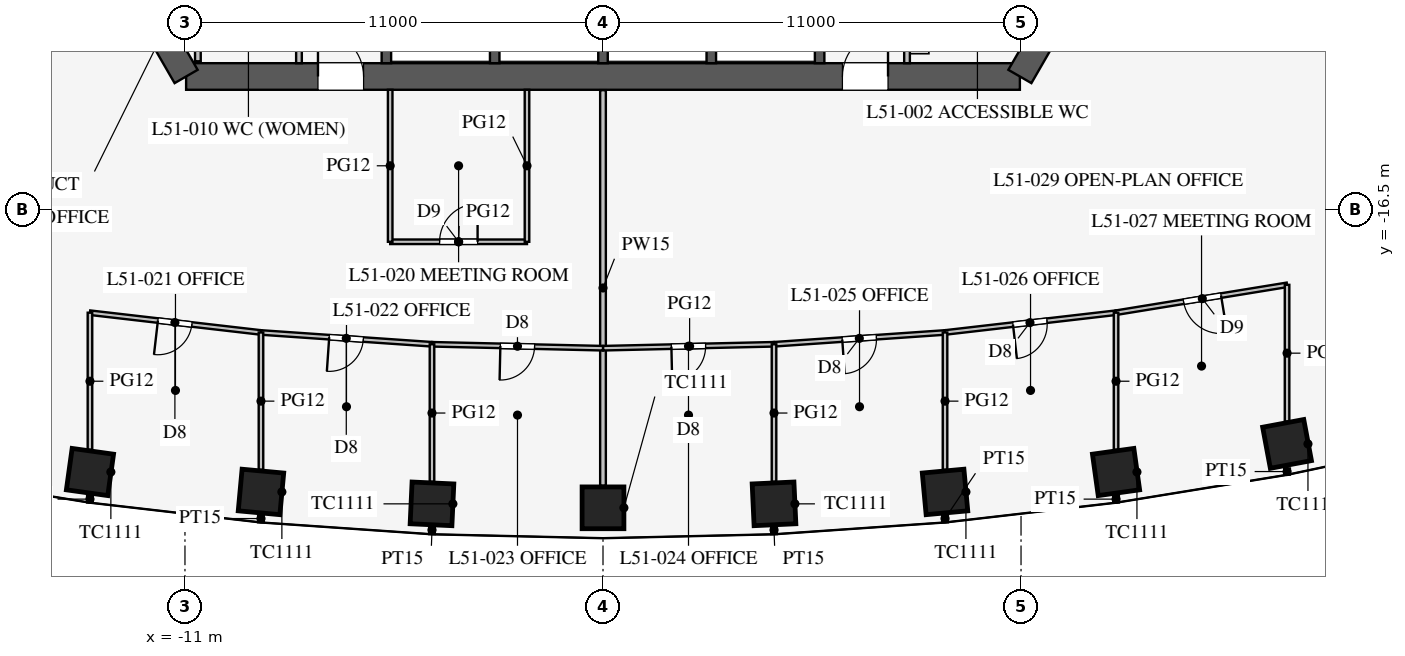
"""IFC4 building model, lengths in metres.
Left out: names, types, materials, properties, quantities, classifications, styles, units other than length and angle.
Written with IfcOpenShell. Run it as: python <this file> out.ifc"""

import sys

from ifc_helpers import new_model, si_unit, direction, frame, frame_2d, origin, origin_2d, place, context, subcontext, project, spatial, rectangle, extrude, element, fill, save


model = new_model("IFC4")
c1 = context("Model", 3, precision=1e-05, world=origin(), true_north=direction((0.0, 1.0)))
c2 = subcontext(c1, "Body", "Model", "MODEL_VIEW")
j1 = project(units=[si_unit("LENGTHUNIT", "METRE"), si_unit("PLANEANGLEUNIT", "RADIAN")], contexts=[c1])
p1 = place(None, origin())
s1 = spatial("IfcSite", under=j1, at=p1, CompositionType="ELEMENT")
p2 = place(p1, origin())
s2 = spatial("IfcBuilding", under=s1, at=p2, CompositionType="ELEMENT")
p3 = place(p2, frame((0.0, 0.0, 223.3)))
s3 = spatial("IfcBuildingStorey", under=s2, at=p3, CompositionType="ELEMENT", Elevation=223.3)
for number, where, z_axis, x_axis in (
    (1, (-13.5, -23.408, 0.0), (0.0, 0.0, 1.0), (0.99, -0.138, 0.0)),
    (2, (-9.0, -23.933, 0.0), (0.0, 0.0, 1.0), (0.996, -0.092, 0.0)),
    (3, (-4.5, -24.246, 0.0), (0.0, 0.0, 1.0), (0.999, -0.046, 0.0)),
    (4, (0.0, -24.351, 0.0), (0.0, 0.0, 1.0), (1.0, 0.0, 0.0)),
    (5, (4.5, -24.246, 0.0), (0.0, 0.0, 1.0), (0.999, 0.046, 0.0)),
    (6, (9.0, -23.933, 0.0), (0.0, 0.0, 1.0), (0.996, 0.092, 0.0)),
    (7, (13.5, -23.408, 0.0), (0.0, 0.0, 1.0), (0.99, 0.138, 0.0)),
    (8, (18.0, -22.669, 0.0), (0.0, 0.0, 1.0), (0.983, 0.184, 0.0)),
):
    element("IfcColumn", number, at=place(p3, frame(where, z_axis=z_axis, x_axis=x_axis)), inside=s3, PredefinedType="COLUMN", context=c2, shape_type="SweptSolid", body=[
        extrude(rectangle(XDim=1.1, YDim=1.1, at=origin_2d()), origin(), (0.0, 0.0, 1.0), 4.2),
    ])
p4 = place(p3, frame((-10.97, -13.0, 0.0), z_axis=(0.0, 0.0, 1.0), x_axis=(1.0, 0.0, 0.0)))
e9 = element("IfcWall", 9, at=p4, inside=s3, PredefinedType="SHEAR", context=c2, shape_type="SweptSolid", body=[
    extrude(rectangle(XDim=21.939, YDim=0.7, at=frame_2d((10.97, 0.0))), origin(), (0.0, 0.0, 1.0), 4.2),
])
p5 = place(p4, frame((17.27, 0.0, 0.0)))
e10 = element("IfcOpeningElement", 10, at=p5, cuts=e9, PredefinedType="OPENING", context=c2, shape_type="SweptSolid", body=[
    extrude(rectangle(XDim=1.2, YDim=2.1, at=frame_2d((0.6, 1.05))), frame((0.0, 0.36, 0.0), z_axis=(0.0, -1.0, 0.0), x_axis=(1.0, 0.0, 0.0)), (0.0, 0.0, 1.0), 0.72),
])
p6 = place(p4, frame((3.47, 0.0, 0.0)))
e11 = element("IfcOpeningElement", 11, at=p6, cuts=e9, PredefinedType="OPENING", context=c2, shape_type="SweptSolid", body=[
    extrude(rectangle(XDim=1.2, YDim=2.1, at=frame_2d((0.6, 1.05))), frame((0.0, 0.36, 0.0), z_axis=(0.0, -1.0, 0.0), x_axis=(1.0, 0.0, 0.0)), (0.0, 0.0, 1.0), 0.72),
])
for number, where, z_axis, x_axis in (
    (12, (10.97, -13.0, 0.0), (0.0, 0.0, 1.0), (0.5, 0.866, 0.0)),
    (13, (-16.743, -3.0, 0.0), (0.0, 0.0, 1.0), (0.5, -0.866, 0.0)),
):
    element("IfcWall", number, at=place(p3, frame(where, z_axis=z_axis, x_axis=x_axis)), inside=s3, PredefinedType="SHEAR", context=c2, shape_type="SweptSolid", body=[
        extrude(rectangle(XDim=11.547, YDim=0.7, at=frame_2d((5.773, 0.0))), origin(), (0.0, 0.0, 1.0), 4.2),
    ])
for number, where, z_axis, x_axis in (
    (14, (-5.7, -10.025, 0.0), (0.0, 0.0, 1.0), (0.0, -1.0, 0.0)),
    (15, (-2.85, -10.025, 0.0), (0.0, 0.0, 1.0), (0.0, -1.0, 0.0)),
    (16, (0.0, -10.025, 0.0), (0.0, 0.0, 1.0), (0.0, -1.0, 0.0)),
    (17, (2.85, -10.025, 0.0), (0.0, 0.0, 1.0), (0.0, -1.0, 0.0)),
    (18, (5.7, -10.025, 0.0), (0.0, 0.0, 1.0), (0.0, -1.0, 0.0)),
):
    element("IfcWall", number, at=place(p3, frame(where, z_axis=z_axis, x_axis=x_axis)), inside=s3, PredefinedType="SHEAR", context=c2, shape_type="SweptSolid", body=[
        extrude(rectangle(XDim=2.625, YDim=0.25, at=frame_2d((1.312, 0.0))), origin(), (0.0, 0.0, 1.0), 4.2),
    ])
p7 = place(p3, frame((8.0, -7.5, 0.0), z_axis=(0.0, 0.0, 1.0), x_axis=(0.0, -1.0, 0.0)))
e19 = element("IfcWall", 19, at=p7, inside=s3, PredefinedType="PARTITIONING", context=c2, shape_type="SweptSolid", body=[
    extrude(rectangle(XDim=5.15, YDim=0.15, at=frame_2d((2.575, 0.0))), origin(), (0.0, 0.0, 1.0), 4.0),
])
p8 = place(p7, frame((2.6, 0.0, 0.0)))
e20 = element("IfcOpeningElement", 20, at=p8, cuts=e19, PredefinedType="OPENING", context=c2, shape_type="SweptSolid", body=[
    extrude(rectangle(XDim=0.9, YDim=2.1, at=frame_2d((0.45, 1.05))), frame((0.0, 0.085, 0.0), z_axis=(0.0, -1.0, 0.0), x_axis=(1.0, 0.0, 0.0)), (0.0, 0.0, 1.0), 0.17),
])
p9 = place(p3, frame((-8.0, -7.5, 0.0), z_axis=(0.0, 0.0, 1.0), x_axis=(0.0, -1.0, 0.0)))
e21 = element("IfcWall", 21, at=p9, inside=s3, PredefinedType="PARTITIONING", context=c2, shape_type="SweptSolid", body=[
    extrude(rectangle(XDim=5.15, YDim=0.15, at=frame_2d((2.575, 0.0))), origin(), (0.0, 0.0, 1.0), 4.0),
])
p10 = place(p9, frame((2.6, 0.0, 0.0)))
e22 = element("IfcOpeningElement", 22, at=p10, cuts=e21, PredefinedType="OPENING", context=c2, shape_type="SweptSolid", body=[
    extrude(rectangle(XDim=0.9, YDim=2.1, at=frame_2d((0.45, 1.05))), frame((0.0, 0.085, 0.0), z_axis=(0.0, -1.0, 0.0), x_axis=(1.0, 0.0, 0.0)), (0.0, 0.0, 1.0), 0.17),
])
p11 = place(p3, frame((-10.66, -8.5, 0.0), z_axis=(0.0, 0.0, 1.0), x_axis=(0.0, -1.0, 0.0)))
e23 = element("IfcWall", 23, at=p11, inside=s3, PredefinedType="PARTITIONING", context=c2, shape_type="SweptSolid", body=[
    extrude(rectangle(XDim=4.1, YDim=0.15, at=frame_2d((2.05, 0.0))), origin(), (0.0, 0.0, 1.0), 4.0),
])
for number, where, z_axis, x_axis in (
    (24, (14.159, -8.175, 0.0), (0.0, 0.0, 1.0), (0.866, -0.5, 0.0)),
    (25, (-14.159, -8.175, 0.0), (0.0, 0.0, 1.0), (-0.866, -0.5, 0.0)),
):
    element("IfcWall", number, at=place(p3, frame(where, z_axis=z_axis, x_axis=x_axis)), inside=s3, PredefinedType="PARTITIONING", context=c2, shape_type="SweptSolid", body=[
        extrude(rectangle(XDim=15.0, YDim=0.15, at=frame_2d((7.5, 0.0))), origin(), (0.0, 0.0, 1.0), 2.4),
    ])
p12 = place(p3, frame((0.0, -13.36, 0.0), z_axis=(0.0, 0.0, 1.0), x_axis=(0.0, -1.0, 0.0)))
e26 = element("IfcWall", 26, at=p12, inside=s3, PredefinedType="PARTITIONING", context=c2, shape_type="SweptSolid", body=[
    extrude(rectangle(XDim=10.411, YDim=0.15, at=frame_2d((5.205, 0.0))), origin(), (0.0, 0.0, 1.0), 3.3),
])
p13 = place(p3, frame((-5.6, -17.35, 0.0), z_axis=(0.0, 0.0, 1.0), x_axis=(1.0, 0.0, 0.0)))
e27 = element("IfcWall", 27, at=p13, inside=s3, PredefinedType="PARTITIONING", context=c2, shape_type="SweptSolid", body=[
    extrude(rectangle(XDim=3.6, YDim=0.12, at=frame_2d((1.8, 0.0))), origin(), (0.0, 0.0, 1.0), 2.9),
])
p14 = place(p13, frame((1.3, 0.0, 0.15)))
e28 = element("IfcOpeningElement", 28, at=p14, cuts=e27, PredefinedType="OPENING", context=c2, shape_type="SweptSolid", body=[
    extrude(rectangle(XDim=1.0, YDim=2.1, at=frame_2d((0.5, 1.05))), frame((0.0, 0.07, 0.0), z_axis=(0.0, -1.0, 0.0), x_axis=(1.0, 0.0, 0.0)), (0.0, 0.0, 1.0), 0.14),
])
for number, where, z_axis, x_axis in (
    (29, (-2.0, -13.35, 0.0), (0.0, 0.0, 1.0), (0.0, -1.0, 0.0)),
    (30, (-5.6, -13.35, 0.0), (0.0, 0.0, 1.0), (0.0, -1.0, 0.0)),
):
    element("IfcWall", number, at=place(p3, frame(where, z_axis=z_axis, x_axis=x_axis)), inside=s3, PredefinedType="PARTITIONING", context=c2, shape_type="SweptSolid", body=[
        extrude(rectangle(XDim=4.0, YDim=0.12, at=frame_2d((2.0, 0.0))), origin(), (0.0, 0.0, 1.0), 2.9),
    ])
p15 = place(p3, frame((13.5, -24.033, 0.0), z_axis=(0.0, 0.0, 1.0), x_axis=(0.0, -1.0, 0.0)))
e31 = element("IfcWall", 31, at=p15, inside=s3, PredefinedType="PARTITIONING", context=c2, shape_type="SweptSolid", body=[
    extrude(rectangle(XDim=0.178, YDim=0.15, at=frame_2d((0.089, 0.0))), origin(), (0.0, 0.0, 1.0), 2.9),
])
p16 = place(p3, frame((18.0, -23.315, 0.0), z_axis=(0.0, 0.0, 1.0), x_axis=(0.0, -1.0, 0.0)))
e32 = element("IfcWall", 32, at=p16, inside=s3, PredefinedType="PARTITIONING", context=c2, shape_type="SweptSolid", body=[
    extrude(rectangle(XDim=0.163, YDim=0.15, at=frame_2d((0.082, 0.0))), origin(), (0.0, 0.0, 1.0), 2.9),
])
p17 = place(p3, frame((4.5, -24.825, 0.0), z_axis=(0.0, 0.0, 1.0), x_axis=(0.0, -1.0, 0.0)))
e33 = element("IfcWall", 33, at=p17, inside=s3, PredefinedType="PARTITIONING", context=c2, shape_type="SweptSolid", body=[
    extrude(rectangle(XDim=0.217, YDim=0.15, at=frame_2d((0.108, 0.0))), origin(), (0.0, 0.0, 1.0), 2.9),
])
p18 = place(p3, frame((9.0, -24.535, 0.0), z_axis=(0.0, 0.0, 1.0), x_axis=(0.0, -1.0, 0.0)))
e34 = element("IfcWall", 34, at=p18, inside=s3, PredefinedType="PARTITIONING", context=c2, shape_type="SweptSolid", body=[
    extrude(rectangle(XDim=0.196, YDim=0.15, at=frame_2d((0.098, 0.0))), origin(), (0.0, 0.0, 1.0), 2.9),
])
p19 = place(p3, frame((-13.5, -24.033, 0.0), z_axis=(0.0, 0.0, 1.0), x_axis=(0.0, -1.0, 0.0)))
e35 = element("IfcWall", 35, at=p19, inside=s3, PredefinedType="PARTITIONING", context=c2, shape_type="SweptSolid", body=[
    extrude(rectangle(XDim=0.178, YDim=0.15, at=frame_2d((0.089, 0.0))), origin(), (0.0, 0.0, 1.0), 2.9),
])
p20 = place(p3, frame((-4.5, -24.825, 0.0), z_axis=(0.0, 0.0, 1.0), x_axis=(0.0, -1.0, 0.0)))
e36 = element("IfcWall", 36, at=p20, inside=s3, PredefinedType="PARTITIONING", context=c2, shape_type="SweptSolid", body=[
    extrude(rectangle(XDim=0.217, YDim=0.15, at=frame_2d((0.108, 0.0))), origin(), (0.0, 0.0, 1.0), 2.9),
])
p21 = place(p3, frame((-9.0, -24.535, 0.0), z_axis=(0.0, 0.0, 1.0), x_axis=(0.0, -1.0, 0.0)))
e37 = element("IfcWall", 37, at=p21, inside=s3, PredefinedType="PARTITIONING", context=c2, shape_type="SweptSolid", body=[
    extrude(rectangle(XDim=0.196, YDim=0.15, at=frame_2d((0.098, 0.0))), origin(), (0.0, 0.0, 1.0), 2.9),
])
p22 = place(p3, frame((0.0, -20.151, 0.0), z_axis=(0.0, 0.0, 1.0), x_axis=(0.99973552509, 0.022997388381, 0.0)))
e38 = element("IfcWall", 38, at=p22, inside=s3, PredefinedType="PARTITIONING", context=c2, shape_type="SweptSolid", body=[
    extrude(rectangle(XDim=4.501, YDim=0.12, at=frame_2d((2.25, 0.0))), origin(), (0.0, 0.0, 1.0), 2.9),
])
p23 = place(p22, frame((1.8, 0.0, 0.15)))
e39 = element("IfcOpeningElement", 39, at=p23, cuts=e38, PredefinedType="OPENING", context=c2, shape_type="SweptSolid", body=[
    extrude(rectangle(XDim=0.9, YDim=2.1, at=frame_2d((0.45, 1.05))), frame((0.0, 0.07, 0.0), z_axis=(0.0, -1.0, 0.0), x_axis=(1.0, 0.0, 0.0)), (0.0, 0.0, 1.0), 0.14),
])
p24 = place(p3, frame((13.5, -19.216, 0.0), z_axis=(0.0, 0.0, 1.0), x_axis=(0.986986525477, 0.160802980469, 0.0)))
e40 = element("IfcWall", 40, at=p24, inside=s3, PredefinedType="PARTITIONING", context=c2, shape_type="SweptSolid", body=[
    extrude(rectangle(XDim=4.559, YDim=0.12, at=frame_2d((2.28, 0.0))), origin(), (0.0, 0.0, 1.0), 2.9),
])
p25 = place(p24, frame((1.8, 0.0, 0.15)))
e41 = element("IfcOpeningElement", 41, at=p25, cuts=e40, PredefinedType="OPENING", context=c2, shape_type="SweptSolid", body=[
    extrude(rectangle(XDim=1.0, YDim=2.1, at=frame_2d((0.5, 1.05))), frame((0.0, 0.07, 0.0), z_axis=(0.0, -1.0, 0.0), x_axis=(1.0, 0.0, 0.0)), (0.0, 0.0, 1.0), 0.14),
])
p26 = place(p3, frame((4.5, -20.047, 0.0), z_axis=(0.0, 0.0, 1.0), x_axis=(0.997623533978, 0.068900540297, 0.0)))
e42 = element("IfcWall", 42, at=p26, inside=s3, PredefinedType="PARTITIONING", context=c2, shape_type="SweptSolid", body=[
    extrude(rectangle(XDim=4.511, YDim=0.12, at=frame_2d((2.255, 0.0))), origin(), (0.0, 0.0, 1.0), 2.9),
])
p27 = place(p26, frame((1.8, 0.0, 0.15)))
e43 = element("IfcOpeningElement", 43, at=p27, cuts=e42, PredefinedType="OPENING", context=c2, shape_type="SweptSolid", body=[
    extrude(rectangle(XDim=0.9, YDim=2.1, at=frame_2d((0.45, 1.05))), frame((0.0, 0.07, 0.0), z_axis=(0.0, -1.0, 0.0), x_axis=(1.0, 0.0, 0.0)), (0.0, 0.0, 1.0), 0.14),
])
p28 = place(p3, frame((9.0, -19.736, 0.0), z_axis=(0.0, 0.0, 1.0), x_axis=(0.993382946625, 0.114849124309, 0.0)))
e44 = element("IfcWall", 44, at=p28, inside=s3, PredefinedType="PARTITIONING", context=c2, shape_type="SweptSolid", body=[
    extrude(rectangle(XDim=4.53, YDim=0.12, at=frame_2d((2.265, 0.0))), origin(), (0.0, 0.0, 1.0), 2.9),
])
p29 = place(p28, frame((1.8, 0.0, 0.15)))
e45 = element("IfcOpeningElement", 45, at=p29, cuts=e44, PredefinedType="OPENING", context=c2, shape_type="SweptSolid", body=[
    extrude(rectangle(XDim=0.9, YDim=2.1, at=frame_2d((0.45, 1.05))), frame((0.0, 0.07, 0.0), z_axis=(0.0, -1.0, 0.0), x_axis=(1.0, 0.0, 0.0)), (0.0, 0.0, 1.0), 0.14),
])
p30 = place(p3, frame((-13.5, -19.216, 0.0), z_axis=(0.0, 0.0, 1.0), x_axis=(0.993382946625, -0.114849124309, 0.0)))
e46 = element("IfcWall", 46, at=p30, inside=s3, PredefinedType="PARTITIONING", context=c2, shape_type="SweptSolid", body=[
    extrude(rectangle(XDim=4.53, YDim=0.12, at=frame_2d((2.265, 0.0))), origin(), (0.0, 0.0, 1.0), 2.9),
])
p31 = place(p30, frame((1.8, 0.0, 0.15)))
e47 = element("IfcOpeningElement", 47, at=p31, cuts=e46, PredefinedType="OPENING", context=c2, shape_type="SweptSolid", body=[
    extrude(rectangle(XDim=0.9, YDim=2.1, at=frame_2d((0.45, 1.05))), frame((0.0, 0.07, 0.0), z_axis=(0.0, -1.0, 0.0), x_axis=(1.0, 0.0, 0.0)), (0.0, 0.0, 1.0), 0.14),
])
p32 = place(p3, frame((-4.5, -20.047, 0.0), z_axis=(0.0, 0.0, 1.0), x_axis=(0.99973552509, -0.022997388381, 0.0)))
e48 = element("IfcWall", 48, at=p32, inside=s3, PredefinedType="PARTITIONING", context=c2, shape_type="SweptSolid", body=[
    extrude(rectangle(XDim=4.501, YDim=0.12, at=frame_2d((2.25, 0.0))), origin(), (0.0, 0.0, 1.0), 2.9),
])
p33 = place(p32, frame((1.8, 0.0, 0.15)))
e49 = element("IfcOpeningElement", 49, at=p33, cuts=e48, PredefinedType="OPENING", context=c2, shape_type="SweptSolid", body=[
    extrude(rectangle(XDim=0.9, YDim=2.1, at=frame_2d((0.45, 1.05))), frame((0.0, 0.07, 0.0), z_axis=(0.0, -1.0, 0.0), x_axis=(1.0, 0.0, 0.0)), (0.0, 0.0, 1.0), 0.14),
])
p34 = place(p3, frame((-9.0, -19.736, 0.0), z_axis=(0.0, 0.0, 1.0), x_axis=(0.997623533978, -0.068900540297, 0.0)))
e50 = element("IfcWall", 50, at=p34, inside=s3, PredefinedType="PARTITIONING", context=c2, shape_type="SweptSolid", body=[
    extrude(rectangle(XDim=4.511, YDim=0.12, at=frame_2d((2.255, 0.0))), origin(), (0.0, 0.0, 1.0), 2.9),
])
p35 = place(p34, frame((1.8, 0.0, 0.15)))
e51 = element("IfcOpeningElement", 51, at=p35, cuts=e50, PredefinedType="OPENING", context=c2, shape_type="SweptSolid", body=[
    extrude(rectangle(XDim=0.9, YDim=2.1, at=frame_2d((0.45, 1.05))), frame((0.0, 0.07, 0.0), z_axis=(0.0, -1.0, 0.0), x_axis=(1.0, 0.0, 0.0)), (0.0, 0.0, 1.0), 0.14),
])
p36 = place(p3, frame((13.5, -19.216, 0.0), z_axis=(0.0, 0.0, 1.0), x_axis=(0.0, -1.0, 0.0)))
e52 = element("IfcWall", 52, at=p36, inside=s3, PredefinedType="PARTITIONING", context=c2, shape_type="SweptSolid", body=[
    extrude(rectangle(XDim=3.607, YDim=0.12, at=frame_2d((1.803, 0.0))), origin(), (0.0, 0.0, 1.0), 2.9),
])
p37 = place(p3, frame((18.0, -18.483, 0.0), z_axis=(0.0, 0.0, 1.0), x_axis=(0.0, -1.0, 0.0)))
e53 = element("IfcWall", 53, at=p37, inside=s3, PredefinedType="PARTITIONING", context=c2, shape_type="SweptSolid", body=[
    extrude(rectangle(XDim=3.596, YDim=0.12, at=frame_2d((1.798, 0.0))), origin(), (0.0, 0.0, 1.0), 2.9),
])
p38 = place(p3, frame((4.5, -20.047, 0.0), z_axis=(0.0, 0.0, 1.0), x_axis=(0.0, -1.0, 0.0)))
e54 = element("IfcWall", 54, at=p38, inside=s3, PredefinedType="PARTITIONING", context=c2, shape_type="SweptSolid", body=[
    extrude(rectangle(XDim=3.619, YDim=0.12, at=frame_2d((1.809, 0.0))), origin(), (0.0, 0.0, 1.0), 2.9),
])
p39 = place(p3, frame((9.0, -19.736, 0.0), z_axis=(0.0, 0.0, 1.0), x_axis=(0.0, -1.0, 0.0)))
e55 = element("IfcWall", 55, at=p39, inside=s3, PredefinedType="PARTITIONING", context=c2, shape_type="SweptSolid", body=[
    extrude(rectangle(XDim=3.614, YDim=0.12, at=frame_2d((1.807, 0.0))), origin(), (0.0, 0.0, 1.0), 2.9),
])
p40 = place(p3, frame((-13.5, -19.216, 0.0), z_axis=(0.0, 0.0, 1.0), x_axis=(0.0, -1.0, 0.0)))
e56 = element("IfcWall", 56, at=p40, inside=s3, PredefinedType="PARTITIONING", context=c2, shape_type="SweptSolid", body=[
    extrude(rectangle(XDim=3.607, YDim=0.12, at=frame_2d((1.803, 0.0))), origin(), (0.0, 0.0, 1.0), 2.9),
])
p41 = place(p3, frame((-4.5, -20.047, 0.0), z_axis=(0.0, 0.0, 1.0), x_axis=(0.0, -1.0, 0.0)))
e57 = element("IfcWall", 57, at=p41, inside=s3, PredefinedType="PARTITIONING", context=c2, shape_type="SweptSolid", body=[
    extrude(rectangle(XDim=3.619, YDim=0.12, at=frame_2d((1.809, 0.0))), origin(), (0.0, 0.0, 1.0), 2.9),
])
p42 = place(p3, frame((-9.0, -19.736, 0.0), z_axis=(0.0, 0.0, 1.0), x_axis=(0.0, -1.0, 0.0)))
e58 = element("IfcWall", 58, at=p42, inside=s3, PredefinedType="PARTITIONING", context=c2, shape_type="SweptSolid", body=[
    extrude(rectangle(XDim=3.614, YDim=0.12, at=frame_2d((1.807, 0.0))), origin(), (0.0, 0.0, 1.0), 2.9),
])
p43 = place(p3, frame((-0.016, 30.392, 0.0), z_axis=(0.0, 0.0, 1.0), x_axis=(-0.500000626146, -0.866025042278, 0.0)))
e59 = element("IfcWall", 59, at=p43, inside=s3, PredefinedType="PARTITIONING", context=c2, shape_type="SweptSolid", body=[
    extrude(rectangle(XDim=52.624, YDim=0.12, at=frame_2d((26.312, 0.0))), origin(), (0.0, 0.0, 1.0), 2.9),
])
p44 = place(p43, frame((10.15, 0.0, 0.15)))
e60 = element("IfcOpeningElement", 60, at=p44, cuts=e59, PredefinedType="OPENING", context=c2, shape_type="SweptSolid", body=[
    extrude(rectangle(XDim=1.8, YDim=2.1, at=frame_2d((0.9, 1.05))), frame((0.0, 0.07, 0.0), z_axis=(0.0, -1.0, 0.0), x_axis=(1.0, 0.0, 0.0)), (0.0, 0.0, 1.0), 0.14),
])
p45 = place(p43, frame((40.65, 0.0, 0.15)))
e61 = element("IfcOpeningElement", 61, at=p45, cuts=e59, PredefinedType="OPENING", context=c2, shape_type="SweptSolid", body=[
    extrude(rectangle(XDim=1.8, YDim=2.1, at=frame_2d((0.9, 1.05))), frame((0.0, 0.07, 0.0), z_axis=(0.0, -1.0, 0.0), x_axis=(1.0, 0.0, 0.0)), (0.0, 0.0, 1.0), 0.14),
])
p46 = place(p5, origin())
e62 = element("IfcDoor", 62, at=p46, inside=s3, OperationType="SINGLE_SWING_RIGHT", PredefinedType="DOOR", context=c2, shape_type="SweptSolid", body=[
    extrude(rectangle(XDim=1.2, YDim=2.1, at=frame_2d((0.6, 1.05))), frame((0.0, 0.025, 0.0), z_axis=(0.0, -1.0, 0.0), x_axis=(1.0, 0.0, 0.0)), (0.0, 0.0, 1.0), 0.05),
])
fill(e10, e62)
p47 = place(p6, origin())
e63 = element("IfcDoor", 63, at=p47, inside=s3, OperationType="SINGLE_SWING_LEFT", PredefinedType="DOOR", context=c2, shape_type="SweptSolid", body=[
    extrude(rectangle(XDim=1.2, YDim=2.1, at=frame_2d((0.6, 1.05))), frame((0.0, 0.025, 0.0), z_axis=(0.0, -1.0, 0.0), x_axis=(1.0, 0.0, 0.0)), (0.0, 0.0, 1.0), 0.05),
])
fill(e11, e63)
p48 = place(p14, origin())
e64 = element("IfcDoor", 64, at=p48, inside=s3, OperationType="SINGLE_SWING_RIGHT", PredefinedType="DOOR", context=c2, shape_type="SweptSolid", body=[
    extrude(rectangle(XDim=1.0, YDim=2.1, at=frame_2d((0.5, 1.05))), frame((0.0, 0.025, 0.0), z_axis=(0.0, -1.0, 0.0), x_axis=(1.0, 0.0, 0.0)), (0.0, 0.0, 1.0), 0.05),
])
fill(e28, e64)
p49 = place(p31, frame((0.9, 0.0, 0.0), z_axis=(0.0, 0.0, 1.0), x_axis=(-1.0, 0.0, 0.0)))
e65 = element("IfcDoor", 65, at=p49, inside=s3, OperationType="SINGLE_SWING_RIGHT", PredefinedType="DOOR", context=c2, shape_type="SweptSolid", body=[
    extrude(rectangle(XDim=0.9, YDim=2.1, at=frame_2d((0.45, 1.05))), frame((0.0, 0.025, 0.0), z_axis=(0.0, -1.0, 0.0), x_axis=(1.0, 0.0, 0.0)), (0.0, 0.0, 1.0), 0.05),
])
fill(e47, e65)
p50 = place(p35, frame((0.9, 0.0, 0.0), z_axis=(0.0, 0.0, 1.0), x_axis=(-1.0, 0.0, 0.0)))
e66 = element("IfcDoor", 66, at=p50, inside=s3, OperationType="SINGLE_SWING_RIGHT", PredefinedType="DOOR", context=c2, shape_type="SweptSolid", body=[
    extrude(rectangle(XDim=0.9, YDim=2.1, at=frame_2d((0.45, 1.05))), frame((0.0, 0.025, 0.0), z_axis=(0.0, -1.0, 0.0), x_axis=(1.0, 0.0, 0.0)), (0.0, 0.0, 1.0), 0.05),
])
fill(e51, e66)
p51 = place(p33, frame((0.9, 0.0, 0.0), z_axis=(0.0, 0.0, 1.0), x_axis=(-1.0, 0.0, 0.0)))
e67 = element("IfcDoor", 67, at=p51, inside=s3, OperationType="SINGLE_SWING_RIGHT", PredefinedType="DOOR", context=c2, shape_type="SweptSolid", body=[
    extrude(rectangle(XDim=0.9, YDim=2.1, at=frame_2d((0.45, 1.05))), frame((0.0, 0.025, 0.0), z_axis=(0.0, -1.0, 0.0), x_axis=(1.0, 0.0, 0.0)), (0.0, 0.0, 1.0), 0.05),
])
fill(e49, e67)
p52 = place(p23, frame((0.9, 0.0, 0.0), z_axis=(0.0, 0.0, 1.0), x_axis=(-1.0, 0.0, 0.0)))
e68 = element("IfcDoor", 68, at=p52, inside=s3, OperationType="SINGLE_SWING_RIGHT", PredefinedType="DOOR", context=c2, shape_type="SweptSolid", body=[
    extrude(rectangle(XDim=0.9, YDim=2.1, at=frame_2d((0.45, 1.05))), frame((0.0, 0.025, 0.0), z_axis=(0.0, -1.0, 0.0), x_axis=(1.0, 0.0, 0.0)), (0.0, 0.0, 1.0), 0.05),
])
fill(e39, e68)
p53 = place(p27, frame((0.9, 0.0, 0.0), z_axis=(0.0, 0.0, 1.0), x_axis=(-1.0, 0.0, 0.0)))
e69 = element("IfcDoor", 69, at=p53, inside=s3, OperationType="SINGLE_SWING_RIGHT", PredefinedType="DOOR", context=c2, shape_type="SweptSolid", body=[
    extrude(rectangle(XDim=0.9, YDim=2.1, at=frame_2d((0.45, 1.05))), frame((0.0, 0.025, 0.0), z_axis=(0.0, -1.0, 0.0), x_axis=(1.0, 0.0, 0.0)), (0.0, 0.0, 1.0), 0.05),
])
fill(e43, e69)
p54 = place(p29, frame((0.9, 0.0, 0.0), z_axis=(0.0, 0.0, 1.0), x_axis=(-1.0, 0.0, 0.0)))
e70 = element("IfcDoor", 70, at=p54, inside=s3, OperationType="SINGLE_SWING_RIGHT", PredefinedType="DOOR", context=c2, shape_type="SweptSolid", body=[
    extrude(rectangle(XDim=0.9, YDim=2.1, at=frame_2d((0.45, 1.05))), frame((0.0, 0.025, 0.0), z_axis=(0.0, -1.0, 0.0), x_axis=(1.0, 0.0, 0.0)), (0.0, 0.0, 1.0), 0.05),
])
fill(e45, e70)
p55 = place(p25, frame((1.0, 0.0, 0.0), z_axis=(0.0, 0.0, 1.0), x_axis=(-1.0, 0.0, 0.0)))
e71 = element("IfcDoor", 71, at=p55, inside=s3, OperationType="SINGLE_SWING_LEFT", PredefinedType="DOOR", context=c2, shape_type="SweptSolid", body=[
    extrude(rectangle(XDim=1.0, YDim=2.1, at=frame_2d((0.5, 1.05))), frame((0.0, 0.025, 0.0), z_axis=(0.0, -1.0, 0.0), x_axis=(1.0, 0.0, 0.0)), (0.0, 0.0, 1.0), 0.05),
])
fill(e41, e71)
save(model, sys.argv[1])
